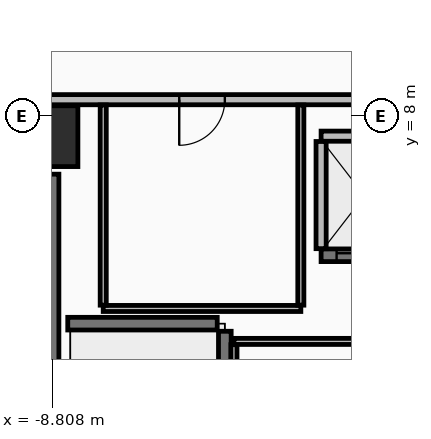
"""IFC4 building model, lengths in metres.
Left out: names, types, materials, properties, quantities, classifications, styles, units other than length and angle.
Written with IfcOpenShell. Run it as: python <this file> out.ifc"""

import sys

from ifc_helpers import new_model, si_unit, direction, frame, frame_2d, origin, origin_2d, place, context, subcontext, project, spatial, rectangle, extrude, element, fill, save


model = new_model("IFC4")
c1 = context("Model", 3, precision=1e-05, world=origin(), true_north=direction((0.0, 1.0)))
c2 = subcontext(c1, "Body", "Model", "MODEL_VIEW")
j1 = project(units=[si_unit("LENGTHUNIT", "METRE"), si_unit("PLANEANGLEUNIT", "RADIAN")], contexts=[c1])
p1 = place(None, origin())
s1 = spatial("IfcSite", under=j1, at=p1, CompositionType="ELEMENT")
p2 = place(p1, origin())
s2 = spatial("IfcBuilding", under=s1, at=p2, CompositionType="ELEMENT")
p3 = place(p2, frame((0.0, 0.0, 149.6)))
s3 = spatial("IfcBuildingStorey", under=s2, at=p3, CompositionType="ELEMENT", Elevation=149.6)
p4 = place(p3, frame((-8.9, 7.6, 0.0), z_axis=(0.0, 0.0, 1.0), x_axis=(1.0, 0.0, 0.0)))
e1 = element("IfcColumn", 1, at=p4, inside=s3, PredefinedType="COLUMN", context=c2, shape_type="SweptSolid", body=[
    extrude(rectangle(XDim=1.2, YDim=1.2, at=origin_2d()), origin(), (0.0, 0.0, 1.0), 3.6),
])
p5 = place(p3, frame((-8.9, -3.85, 0.0), z_axis=(0.0, 0.0, 1.0), x_axis=(0.0, 1.0, 0.0)))
e2 = element("IfcWall", 2, at=p5, inside=s3, PredefinedType="SHEAR", context=c2, shape_type="SweptSolid", body=[
    extrude(rectangle(XDim=10.7, YDim=0.45, at=frame_2d((5.35, 0.0))), origin(), (0.0, 0.0, 1.0), 3.41),
])
p6 = place(p3, frame((9.62, 8.32, 0.0), z_axis=(0.0, 0.0, 1.0), x_axis=(-1.0, 0.0, 0.0)))
e3 = element("IfcWall", 3, at=p6, inside=s3, PredefinedType="PARTITIONING", context=c2, shape_type="SweptSolid", body=[
    extrude(rectangle(XDim=19.24, YDim=0.2, at=frame_2d((9.62, 0.0))), origin(), (0.0, 0.0, 1.0), 2.755),
])
p7 = place(p6, frame((15.02, 0.0, 0.0)))
e4 = element("IfcOpeningElement", 4, at=p7, cuts=e3, PredefinedType="OPENING", context=c2, shape_type="SweptSolid", body=[
    extrude(rectangle(XDim=0.9, YDim=2.1, at=frame_2d((0.45, 1.05))), frame((0.0, 0.11, 0.0), z_axis=(0.0, -1.0, 0.0), x_axis=(1.0, 0.0, 0.0)), (0.0, 0.0, 1.0), 0.22),
])
p8 = place(p3, frame((-5.4, -3.55, 0.0), z_axis=(0.0, 0.0, 1.0), x_axis=(0.0, 1.0, 0.0)))
e5 = element("IfcWall", 5, at=p8, inside=s3, PredefinedType="SHEAR", context=c2, shape_type="SweptSolid", body=[
    extrude(rectangle(XDim=7.3, YDim=0.25, at=frame_2d((3.65, 0.0))), origin(), (0.0, 0.0, 1.0), 3.41),
])
p9 = place(p3, frame((-8.5, 3.9, 0.0), z_axis=(0.0, 0.0, 1.0), x_axis=(1.0, 0.0, 0.0)))
e6 = element("IfcWall", 6, at=p9, inside=s3, PredefinedType="SHEAR", context=c2, shape_type="SweptSolid", body=[
    extrude(rectangle(XDim=2.95, YDim=0.25, at=frame_2d((1.475, 0.0))), origin(), (0.0, 0.0, 1.0), 3.41),
])
p10 = place(p3, frame((-3.5, 5.25, 0.0), z_axis=(0.0, 0.0, 1.0), x_axis=(1.0, 0.0, 0.0)))
e7 = element("IfcWall", 7, at=p10, inside=s3, PredefinedType="SHEAR", context=c2, shape_type="SweptSolid", body=[
    extrude(rectangle(XDim=1.712, YDim=0.25, at=frame_2d((0.856, 0.0))), origin(), (0.0, 0.0, 1.0), 3.41),
])
p11 = place(p10, frame((0.306, 0.0, 0.0)))
e8 = element("IfcOpeningElement", 8, at=p11, cuts=e7, PredefinedType="OPENING", context=c2, shape_type="SweptSolid", body=[
    extrude(rectangle(XDim=1.1, YDim=2.2, at=frame_2d((0.55, 1.1))), frame((0.0, 0.135, 0.0), z_axis=(0.0, -1.0, 0.0), x_axis=(1.0, 0.0, 0.0)), (0.0, 0.0, 1.0), 0.27),
])
p12 = place(p3, frame((-3.5, 7.6, 0.0), z_axis=(0.0, 0.0, 1.0), x_axis=(1.0, 0.0, 0.0)))
e9 = element("IfcWall", 9, at=p12, inside=s3, PredefinedType="PARTITIONING", context=c2, shape_type="SweptSolid", body=[
    extrude(rectangle(XDim=0.7, YDim=0.2, at=frame_2d((0.35, 0.0))), origin(), (0.0, 0.0, 1.0), 2.605),
])
p13 = place(p3, frame((-3.5, 5.38, 0.0), z_axis=(0.0, 0.0, 1.0), x_axis=(0.0, 1.0, 0.0)))
e10 = element("IfcWall", 10, at=p13, inside=s3, PredefinedType="PARTITIONING", context=c2, shape_type="SweptSolid", body=[
    extrude(rectangle(XDim=2.115, YDim=0.2, at=frame_2d((1.058, 0.0))), origin(), (0.0, 0.0, 1.0), 2.605),
])
p14 = place(p3, frame((-1.815, 3.55, 0.0), z_axis=(0.0, 0.0, 1.0), x_axis=(-1.0, 0.0, 0.0)))
e11 = element("IfcWall", 11, at=p14, inside=s3, PredefinedType="PARTITIONING", context=c2, shape_type="SweptSolid", body=[
    extrude(rectangle(XDim=3.405, YDim=0.12, at=frame_2d((1.703, 0.0))), origin(), (0.0, 0.0, 1.0), 3.41),
])
p15 = place(p3, frame((-5.22, 3.485, 0.0), z_axis=(0.0, 0.0, 1.0), x_axis=(0.0, -1.0, 0.0)))
e12 = element("IfcWall", 12, at=p15, inside=s3, PredefinedType="PARTITIONING", context=c2, shape_type="SweptSolid", body=[
    extrude(rectangle(XDim=1.14, YDim=0.12, at=frame_2d((0.57, 0.0))), origin(), (0.0, 0.0, 1.0), 3.41),
])
p16 = place(p3, frame((-7.8, 4.2, 0.0), z_axis=(0.0, 0.0, 1.0), x_axis=(1.0, 0.0, 0.0)))
e13 = element("IfcWall", 13, at=p16, inside=s3, PredefinedType="PARTITIONING", context=c2, shape_type="SweptSolid", body=[
    extrude(rectangle(XDim=3.9, YDim=0.12, at=frame_2d((1.95, 0.0))), origin(), (0.0, 0.0, 1.0), 3.41),
])
for number, where, z_axis, x_axis in (
    (14, (-3.9, 4.265, 0.0), (0.0, 0.0, 1.0), (0.0, 1.0, 0.0)),
    (15, (-7.8, 8.215, 0.0), (0.0, 0.0, 1.0), (0.0, -1.0, 0.0)),
):
    element("IfcWall", number, at=place(p3, frame(where, z_axis=z_axis, x_axis=x_axis)), inside=s3, PredefinedType="PARTITIONING", context=c2, shape_type="SweptSolid", body=[
        extrude(rectangle(XDim=3.95, YDim=0.12, at=frame_2d((1.975, 0.0))), origin(), (0.0, 0.0, 1.0), 2.605),
    ])
p17 = place(p11, origin())
e16 = element("IfcDoor", 16, at=p17, inside=s3, OperationType="SLIDING_TO_LEFT", PredefinedType="DOOR", context=c2, shape_type="SweptSolid", body=[
    extrude(rectangle(XDim=1.1, YDim=2.2, at=frame_2d((0.55, 1.1))), frame((0.0, 0.025, 0.0), z_axis=(0.0, -1.0, 0.0), x_axis=(1.0, 0.0, 0.0)), (0.0, 0.0, 1.0), 0.05),
])
fill(e8, e16)
p18 = place(p7, frame((0.9, 0.0, 0.0), z_axis=(0.0, 0.0, 1.0), x_axis=(-1.0, 0.0, 0.0)))
e17 = element("IfcDoor", 17, at=p18, inside=s3, OperationType="SINGLE_SWING_LEFT", PredefinedType="DOOR", context=c2, shape_type="SweptSolid", body=[
    extrude(rectangle(XDim=0.9, YDim=2.1, at=frame_2d((0.45, 1.05))), frame((0.0, 0.025, 0.0), z_axis=(0.0, -1.0, 0.0), x_axis=(1.0, 0.0, 0.0)), (0.0, 0.0, 1.0), 0.05),
])
fill(e4, e17)
save(model, sys.argv[1])
